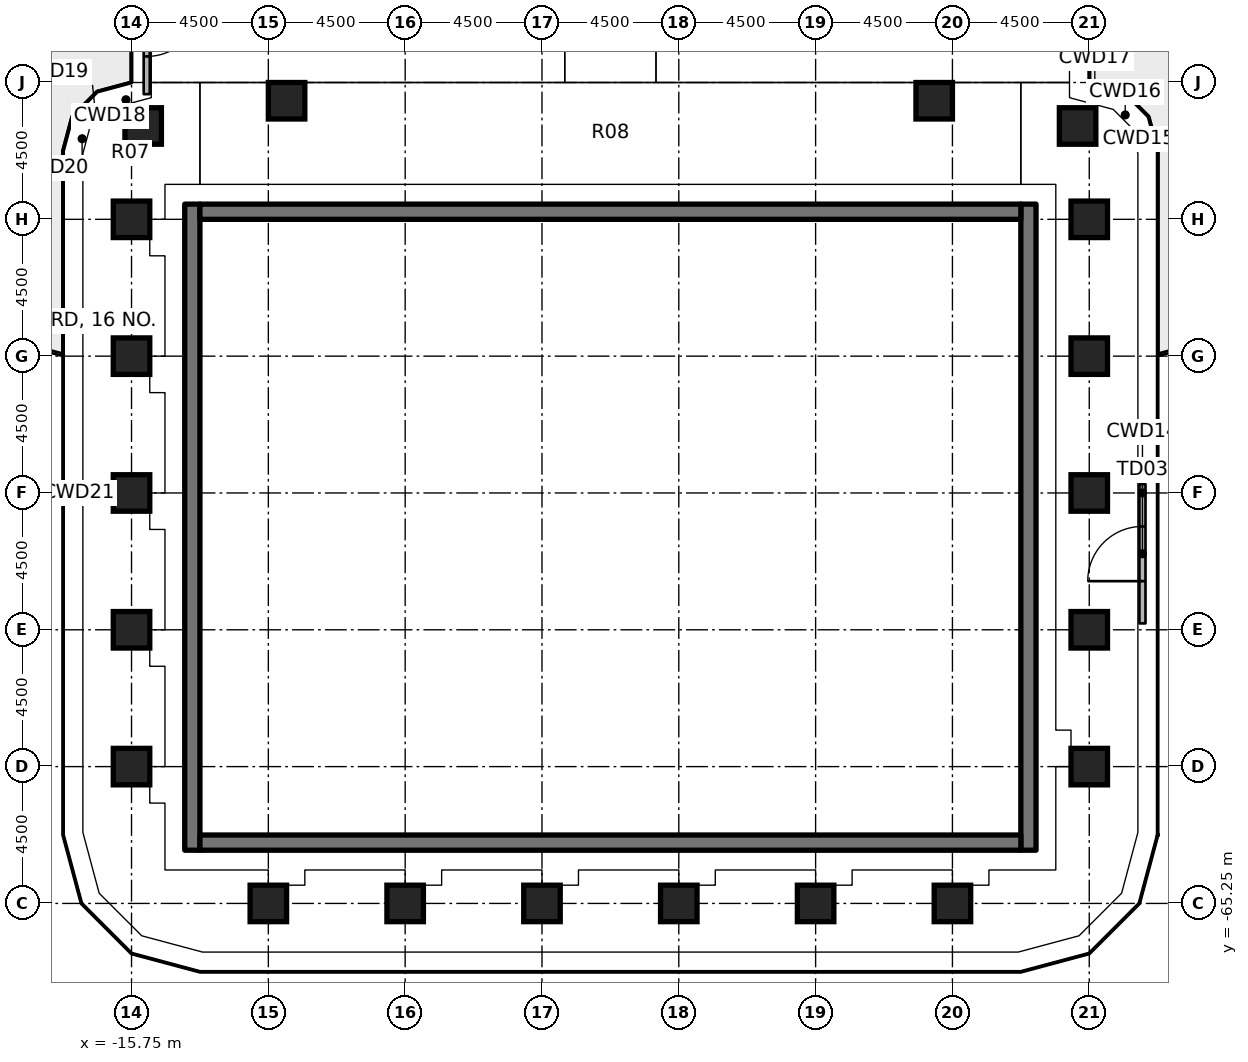
"""IFC4 building model, lengths in metres.
Left out: names, types, materials, properties, quantities, classifications, styles, units other than length and angle.
Written with IfcOpenShell. Run it as: python <this file> out.ifc"""

import sys

from ifc_helpers import new_model, si_unit, direction, frame, frame_2d, origin, origin_2d, place, context, subcontext, project, spatial, rectangle, extrude, element, fill, save


model = new_model("IFC4")
c1 = context("Model", 3, precision=1e-05, world=origin(), true_north=direction((0.0, 1.0)))
c2 = subcontext(c1, "Body", "Model", "MODEL_VIEW")
j1 = project(units=[si_unit("LENGTHUNIT", "METRE"), si_unit("PLANEANGLEUNIT", "RADIAN")], contexts=[c1])
p1 = place(None, origin())
s1 = spatial("IfcSite", under=j1, at=p1, CompositionType="ELEMENT")
p2 = place(p1, origin())
s2 = spatial("IfcBuilding", under=s1, at=p2, CompositionType="ELEMENT")
p3 = place(p2, frame((0.0, 0.0, 17.0)))
s3 = spatial("IfcBuildingStorey", under=s2, at=p3, CompositionType="ELEMENT", Elevation=17.0)
for number, where, z_axis, x_axis in (
    (1, (-15.75, -60.75, 0.0), (0.0, 0.0, 1.0), (1.0, 0.0, 0.0)),
    (2, (-15.75, -56.25, 0.0), (0.0, 0.0, 1.0), (1.0, 0.0, 0.0)),
    (3, (-15.75, -51.75, 0.0), (0.0, 0.0, 1.0), (1.0, 0.0, 0.0)),
    (4, (-15.75, -47.25, 0.0), (0.0, 0.0, 1.0), (1.0, 0.0, 0.0)),
    (5, (-15.75, -42.75, 0.0), (0.0, 0.0, 1.0), (1.0, 0.0, 0.0)),
    (6, (-15.367, -39.68, 0.0), (0.0, 0.0, 1.0), (1.0, 0.0, 0.0)),
    (7, (-11.25, -65.25, 0.0), (0.0, 0.0, 1.0), (1.0, 0.0, 0.0)),
    (8, (-10.65, -38.85, 0.0), (0.0, 0.0, 1.0), (1.0, 0.0, 0.0)),
    (9, (-6.75, -65.25, 0.0), (0.0, 0.0, 1.0), (1.0, 0.0, 0.0)),
    (10, (-2.25, -65.25, 0.0), (0.0, 0.0, 1.0), (1.0, 0.0, 0.0)),
    (11, (2.25, -65.25, 0.0), (0.0, 0.0, 1.0), (1.0, 0.0, 0.0)),
    (12, (6.75, -65.25, 0.0), (0.0, 0.0, 1.0), (1.0, 0.0, 0.0)),
    (13, (11.25, -65.25, 0.0), (0.0, 0.0, 1.0), (1.0, 0.0, 0.0)),
    (14, (10.65, -38.85, 0.0), (0.0, 0.0, 1.0), (1.0, 0.0, 0.0)),
    (15, (15.75, -60.75, 0.0), (0.0, 0.0, 1.0), (1.0, 0.0, 0.0)),
    (16, (15.75, -56.25, 0.0), (0.0, 0.0, 1.0), (1.0, 0.0, 0.0)),
    (17, (15.75, -51.75, 0.0), (0.0, 0.0, 1.0), (1.0, 0.0, 0.0)),
    (18, (15.75, -47.25, 0.0), (0.0, 0.0, 1.0), (1.0, 0.0, 0.0)),
    (19, (15.75, -42.75, 0.0), (0.0, 0.0, 1.0), (1.0, 0.0, 0.0)),
    (20, (15.367, -39.68, 0.0), (0.0, 0.0, 1.0), (1.0, 0.0, 0.0)),
):
    element("IfcColumn", number, at=place(p3, frame(where, z_axis=z_axis, x_axis=x_axis)), inside=s3, PredefinedType="COLUMN", context=c2, shape_type="SweptSolid", body=[
        extrude(rectangle(XDim=1.2, YDim=1.2, at=origin_2d()), origin(), (0.0, 0.0, 1.0), 4.55),
    ])
for number, where, z_axis, x_axis in (
    (21, (-13.75, -63.5, 0.0), (0.0, 0.0, 1.0), (0.0, 1.0, 0.0)),
    (22, (13.75, -63.5, 0.0), (0.0, 0.0, 1.0), (0.0, 1.0, 0.0)),
):
    element("IfcWall", number, at=place(p3, frame(where, z_axis=z_axis, x_axis=x_axis)), inside=s3, PredefinedType="SOLIDWALL", context=c2, shape_type="SweptSolid", body=[
        extrude(rectangle(XDim=21.25, YDim=0.5, at=frame_2d((10.625, 0.0))), origin(), (0.0, 0.0, 1.0), 4.55),
    ])
for number, where, z_axis, x_axis in (
    (23, (-13.5, -63.25, 0.0), (0.0, 0.0, 1.0), (1.0, 0.0, 0.0)),
    (24, (-13.5, -42.5, 0.0), (0.0, 0.0, 1.0), (1.0, 0.0, 0.0)),
):
    element("IfcWall", number, at=place(p3, frame(where, z_axis=z_axis, x_axis=x_axis)), inside=s3, PredefinedType="SOLIDWALL", context=c2, shape_type="SweptSolid", body=[
        extrude(rectangle(XDim=27.0, YDim=0.5, at=frame_2d((13.5, 0.0))), origin(), (0.0, 0.0, 1.0), 4.55),
    ])
p4 = place(p3, frame((17.5, -56.04, 0.0), z_axis=(0.0, 0.0, 1.0), x_axis=(0.0, 1.0, 0.0)))
e25 = element("IfcWall", 25, at=p4, inside=s3, PredefinedType="SOLIDWALL", context=c2, shape_type="SweptSolid", body=[
    extrude(rectangle(XDim=4.58, YDim=0.2, at=frame_2d((2.29, 0.0))), origin(), (0.0, 0.0, 1.0), 4.55),
])
p5 = place(p4, frame((1.39, 0.0, 0.0)))
e26 = element("IfcOpeningElement", 26, at=p5, cuts=e25, PredefinedType="OPENING", context=c2, shape_type="SweptSolid", body=[
    extrude(rectangle(XDim=1.8, YDim=2.4, at=frame_2d((0.9, 1.2))), frame((0.0, 0.11, 0.0), z_axis=(0.0, -1.0, 0.0), x_axis=(1.0, 0.0, 0.0)), (0.0, 0.0, 1.0), 0.22),
])
p6 = place(p3, frame((-15.25, -34.35, 0.0), z_axis=(0.0, 0.0, 1.0), x_axis=(0.0, -1.0, 0.0)))
e27 = element("IfcWall", 27, at=p6, inside=s3, PredefinedType="SOLIDWALL", context=c2, shape_type="SweptSolid", body=[
    extrude(rectangle(XDim=4.283, YDim=0.2, at=frame_2d((2.142, 0.0))), origin(), (0.0, 0.0, 1.0), 4.55),
])
p7 = place(p6, frame((1.242, 0.0, 0.0)))
e28 = element("IfcOpeningElement", 28, at=p7, cuts=e27, PredefinedType="OPENING", context=c2, shape_type="SweptSolid", body=[
    extrude(rectangle(XDim=1.8, YDim=2.4, at=frame_2d((0.9, 1.2))), frame((0.0, 0.11, 0.0), z_axis=(0.0, -1.0, 0.0), x_axis=(1.0, 0.0, 0.0)), (0.0, 0.0, 1.0), 0.22),
])
p8 = place(p5, origin())
e29 = element("IfcDoor", 29, at=p8, inside=s3, OperationType="SINGLE_SWING_LEFT", PredefinedType="DOOR", context=c2, shape_type="SweptSolid", body=[
    extrude(rectangle(XDim=1.8, YDim=2.4, at=frame_2d((0.9, 1.2))), frame((0.0, 0.025, 0.0), z_axis=(0.0, -1.0, 0.0), x_axis=(1.0, 0.0, 0.0)), (0.0, 0.0, 1.0), 0.05),
])
fill(e26, e29)
p9 = place(p7, origin())
e30 = element("IfcDoor", 30, at=p9, inside=s3, OperationType="SINGLE_SWING_LEFT", PredefinedType="DOOR", context=c2, shape_type="SweptSolid", body=[
    extrude(rectangle(XDim=1.8, YDim=2.4, at=frame_2d((0.9, 1.2))), frame((0.0, 0.025, 0.0), z_axis=(0.0, -1.0, 0.0), x_axis=(1.0, 0.0, 0.0)), (0.0, 0.0, 1.0), 0.05),
])
fill(e28, e30)
save(model, sys.argv[1])
